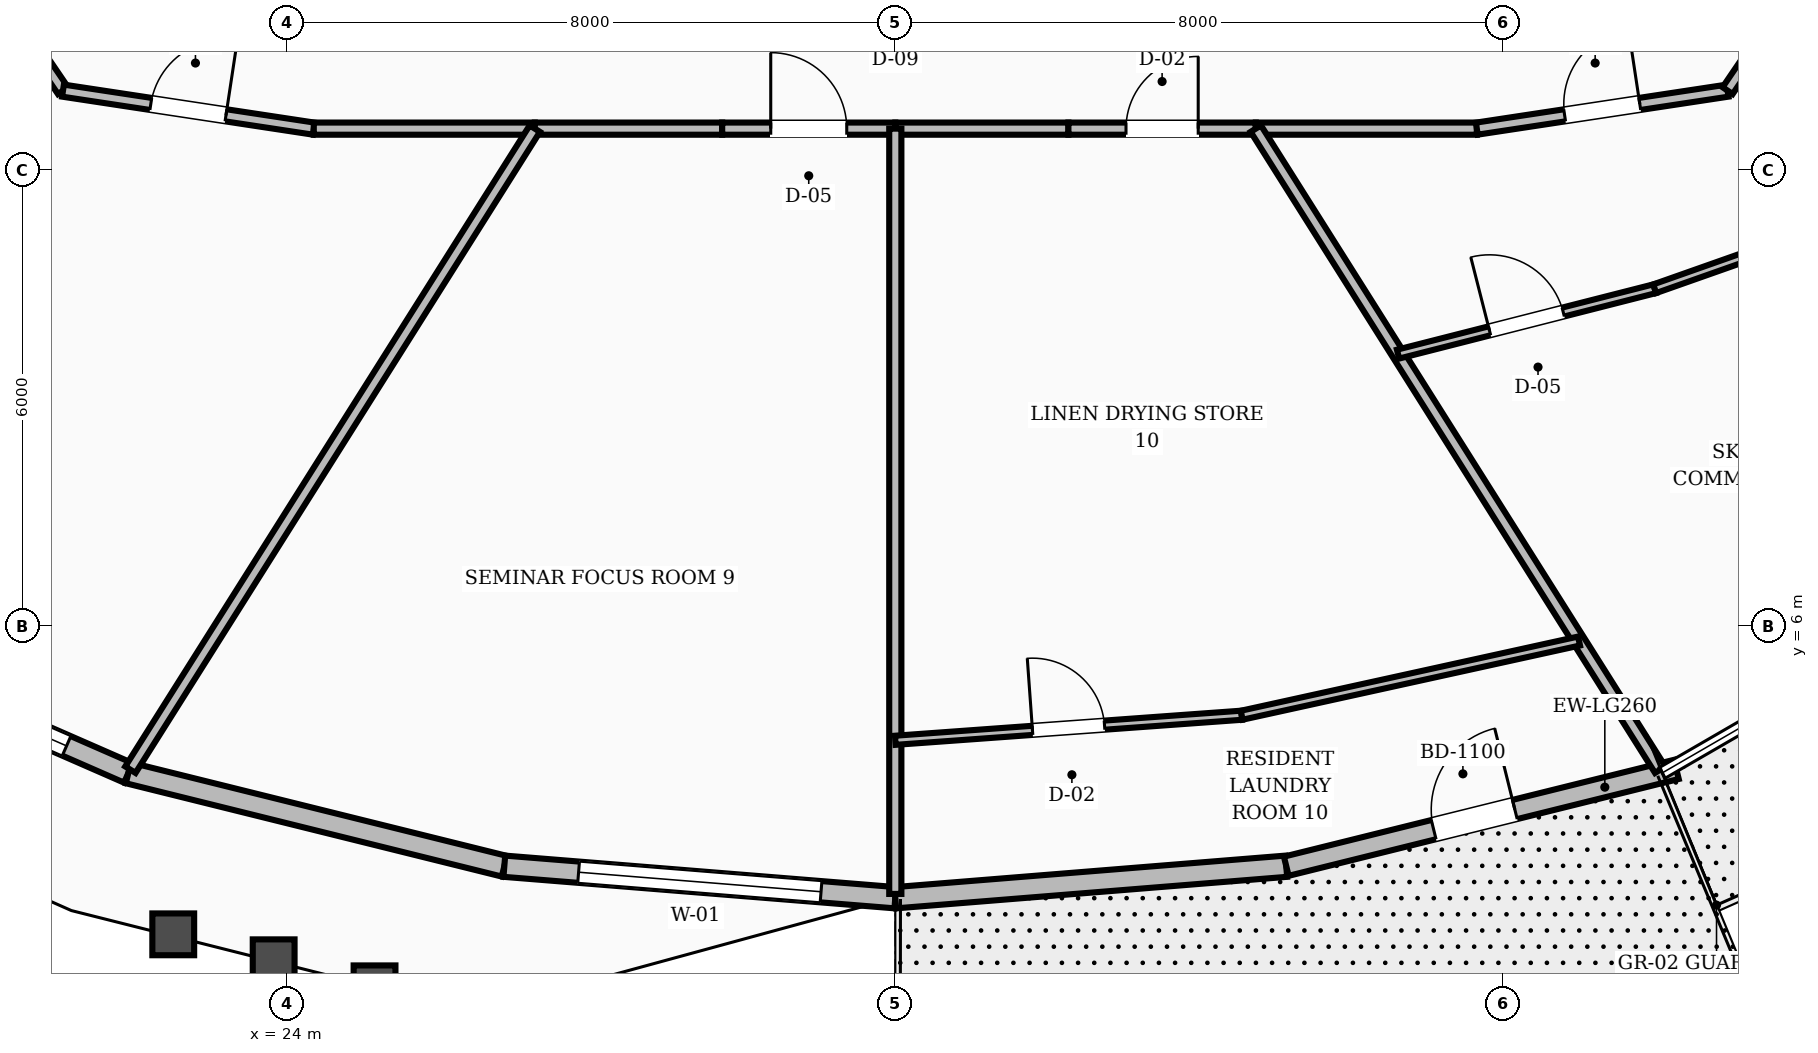
"""IFC4 building model, lengths in metres.
Left out: names, types, materials, properties, quantities, classifications, styles, units other than length and angle.
Written with IfcOpenShell. Run it as: python <this file> out.ifc"""

import sys

from ifc_helpers import new_model, si_unit, direction, frame, frame_2d, origin, place, context, subcontext, project, spatial, rectangle, extrude, element, fill, save


model = new_model("IFC4")
c1 = context("Model", 3, precision=1e-05, world=origin(), true_north=direction((0.0, 1.0)))
c2 = subcontext(c1, "Body", "Model", "MODEL_VIEW")
j1 = project(units=[si_unit("LENGTHUNIT", "METRE"), si_unit("PLANEANGLEUNIT", "RADIAN")], contexts=[c1])
p1 = place(None, origin())
s1 = spatial("IfcSite", under=j1, at=p1, CompositionType="ELEMENT")
p2 = place(p1, origin())
s2 = spatial("IfcBuilding", under=s1, at=p2, CompositionType="ELEMENT")
p3 = place(p2, frame((0.0, 0.0, 149.6)))
s3 = spatial("IfcBuildingStorey", under=s2, at=p3, CompositionType="ELEMENT", Elevation=149.6)
p4 = place(p3, frame((17.352, 6.067, 0.0), z_axis=(0.0, 0.0, 1.0), x_axis=(0.916239532795, -0.400630900634, 0.0)))
e1 = element("IfcWall", 1, at=p4, inside=s3, PredefinedType="STANDARD", context=c2, shape_type="SweptSolid", body=[
    extrude(rectangle(XDim=4.975, YDim=0.28, at=frame_2d((2.488, 0.0))), origin(), (0.0, 0.0, 1.0), 2.82),
])
p5 = place(p4, frame((0.887, 0.0, 0.8)))
e2 = element("IfcOpeningElement", 2, at=p5, cuts=e1, PredefinedType="OPENING", context=c2, shape_type="SweptSolid", body=[
    extrude(rectangle(XDim=3.2, YDim=1.65, at=frame_2d((1.6, 0.825))), frame((0.0, 0.15, 0.0), z_axis=(0.0, -1.0, 0.0), x_axis=(1.0, 0.0, 0.0)), (0.0, 0.0, 1.0), 0.3),
])
p6 = place(p3, frame((21.91, 4.074, 0.0), z_axis=(0.0, 0.0, 1.0), x_axis=(0.97056654197, -0.24083311153, 0.0)))
e3 = element("IfcWall", 3, at=p6, inside=s3, PredefinedType="STANDARD", context=c2, shape_type="SweptSolid", body=[
    extrude(rectangle(XDim=5.096, YDim=0.28, at=frame_2d((2.548, 0.0))), origin(), (0.0, 0.0, 1.0), 2.82),
])
p7 = place(p3, frame((26.856, 2.846, 0.0), z_axis=(0.0, 0.0, 1.0), x_axis=(0.996768172261, -0.080331878898, 0.0)))
e4 = element("IfcWall", 4, at=p7, inside=s3, PredefinedType="STANDARD", context=c2, shape_type="SweptSolid", body=[
    extrude(rectangle(XDim=5.16, YDim=0.28, at=frame_2d((2.58, 0.0))), origin(), (0.0, 0.0, 1.0), 2.82),
])
p8 = place(p7, frame((0.98, 0.0, 0.8)))
e5 = element("IfcOpeningElement", 5, at=p8, cuts=e4, PredefinedType="OPENING", context=c2, shape_type="SweptSolid", body=[
    extrude(rectangle(XDim=3.2, YDim=1.65, at=frame_2d((1.6, 0.825))), frame((0.0, 0.15, 0.0), z_axis=(0.0, -1.0, 0.0), x_axis=(1.0, 0.0, 0.0)), (0.0, 0.0, 1.0), 0.3),
])
p9 = place(p3, frame((32.0, 2.432, 0.0), z_axis=(0.0, 0.0, 1.0), x_axis=(0.996768172261, 0.080331878898, 0.0)))
e6 = element("IfcWall", 6, at=p9, inside=s3, PredefinedType="STANDARD", context=c2, shape_type="SweptSolid", body=[
    extrude(rectangle(XDim=5.16, YDim=0.28, at=frame_2d((2.58, 0.0))), origin(), (0.0, 0.0, 1.0), 2.82),
])
p10 = place(p3, frame((37.144, 2.846, 0.0), z_axis=(0.0, 0.0, 1.0), x_axis=(0.970567406562, 0.240829627165, 0.0)))
e7 = element("IfcWall", 7, at=p10, inside=s3, PredefinedType="STANDARD", context=c2, shape_type="SweptSolid", body=[
    extrude(rectangle(XDim=5.288, YDim=0.26, at=frame_2d((2.644, 0.0))), origin(), (0.0, 0.0, 1.0), 2.82),
])
p11 = place(p10, frame((1.998, 0.0, 0.0)))
e8 = element("IfcOpeningElement", 8, at=p11, cuts=e7, PredefinedType="OPENING", context=c2, shape_type="SweptSolid", body=[
    extrude(rectangle(XDim=1.1, YDim=2.15, at=frame_2d((0.55, 1.075))), frame((0.0, 0.14, 0.0), z_axis=(0.0, -1.0, 0.0), x_axis=(1.0, 0.0, 0.0)), (0.0, 0.0, 1.0), 0.28),
])
p12 = place(p3, frame((19.35, 15.548, 0.0), z_axis=(0.0, 0.0, 1.0), x_axis=(0.562674669208, -0.826678423955, 0.0)))
e9 = element("IfcWall", 9, at=p12, inside=s3, PredefinedType="SOLIDWALL", context=c2, shape_type="SweptSolid", body=[
    extrude(rectangle(XDim=3.021, YDim=0.16, at=frame_2d((1.511, 0.0))), origin(), (0.0, 0.0, 1.0), 2.8),
])
p13 = place(p3, frame((21.05, 13.05, 0.0), z_axis=(0.0, 0.0, 1.0), x_axis=(0.988710906508, -0.149835721217, 0.0)))
e10 = element("IfcWall", 10, at=p13, inside=s3, PredefinedType="SOLIDWALL", context=c2, shape_type="SweptSolid", body=[
    extrude(rectangle(XDim=3.337, YDim=0.16, at=frame_2d((1.668, 0.0))), origin(), (0.0, 0.0, 1.0), 2.8),
])
p14 = place(p13, frame((1.168, 0.0, 0.0)))
e11 = element("IfcOpeningElement", 11, at=p14, cuts=e10, PredefinedType="OPENING", context=c2, shape_type="SweptSolid", body=[
    extrude(rectangle(XDim=1.0, YDim=2.1, at=frame_2d((0.5, 1.05))), frame((0.0, 0.09, 0.0), z_axis=(0.0, -1.0, 0.0), x_axis=(1.0, 0.0, 0.0)), (0.0, 0.0, 1.0), 0.18),
])
p15 = place(p3, frame((24.349, 12.55, 0.0), z_axis=(0.0, 0.0, 1.0), x_axis=(1.0, 0.0, 0.0)))
e12 = element("IfcWall", 12, at=p15, inside=s3, PredefinedType="SOLIDWALL", context=c2, shape_type="SweptSolid", body=[
    extrude(rectangle(XDim=2.908, YDim=0.16, at=frame_2d((1.454, 0.0))), origin(), (0.0, 0.0, 1.0), 2.8),
])
p16 = place(p3, frame((27.257, 12.55, 0.0), z_axis=(0.0, 0.0, 1.0), x_axis=(1.0, 0.0, 0.0)))
e13 = element("IfcWall", 13, at=p16, inside=s3, PredefinedType="SOLIDWALL", context=c2, shape_type="SweptSolid", body=[
    extrude(rectangle(XDim=2.465, YDim=0.16, at=frame_2d((1.232, 0.0))), origin(), (0.0, 0.0, 1.0), 2.8),
])
p17 = place(p3, frame((29.722, 12.55, 0.0), z_axis=(0.0, 0.0, 1.0), x_axis=(1.0, 0.0, 0.0)))
e14 = element("IfcWall", 14, at=p17, inside=s3, PredefinedType="SOLIDWALL", context=c2, shape_type="SweptSolid", body=[
    extrude(rectangle(XDim=2.278, YDim=0.16, at=frame_2d((1.139, 0.0))), origin(), (0.0, 0.0, 1.0), 2.8),
])
p18 = place(p17, frame((0.639, 0.0, 0.0)))
e15 = element("IfcOpeningElement", 15, at=p18, cuts=e14, PredefinedType="OPENING", context=c2, shape_type="SweptSolid", body=[
    extrude(rectangle(XDim=1.0, YDim=2.1, at=frame_2d((0.5, 1.05))), frame((0.0, 0.09, 0.0), z_axis=(0.0, -1.0, 0.0), x_axis=(1.0, 0.0, 0.0)), (0.0, 0.0, 1.0), 0.18),
])
p19 = place(p3, frame((32.0, 12.55, 0.0), z_axis=(0.0, 0.0, 1.0), x_axis=(1.0, 0.0, 0.0)))
e16 = element("IfcWall", 16, at=p19, inside=s3, PredefinedType="SOLIDWALL", context=c2, shape_type="SweptSolid", body=[
    extrude(rectangle(XDim=2.278, YDim=0.16, at=frame_2d((1.139, 0.0))), origin(), (0.0, 0.0, 1.0), 2.8),
])
p20 = place(p3, frame((34.278, 12.55, 0.0), z_axis=(0.0, 0.0, 1.0), x_axis=(1.0, 0.0, 0.0)))
e17 = element("IfcWall", 17, at=p20, inside=s3, PredefinedType="SOLIDWALL", context=c2, shape_type="SweptSolid", body=[
    extrude(rectangle(XDim=2.465, YDim=0.16, at=frame_2d((1.232, 0.0))), origin(), (0.0, 0.0, 1.0), 2.8),
])
p21 = place(p20, frame((0.758, 0.0, 0.0)))
e18 = element("IfcOpeningElement", 18, at=p21, cuts=e17, PredefinedType="OPENING", context=c2, shape_type="SweptSolid", body=[
    extrude(rectangle(XDim=0.95, YDim=2.1, at=frame_2d((0.475, 1.05))), frame((0.0, 0.09, 0.0), z_axis=(0.0, -1.0, 0.0), x_axis=(1.0, 0.0, 0.0)), (0.0, 0.0, 1.0), 0.18),
])
p22 = place(p3, frame((36.743, 12.55, 0.0), z_axis=(0.0, 0.0, 1.0), x_axis=(1.0, 0.0, 0.0)))
e19 = element("IfcWall", 19, at=p22, inside=s3, PredefinedType="SOLIDWALL", context=c2, shape_type="SweptSolid", body=[
    extrude(rectangle(XDim=2.908, YDim=0.16, at=frame_2d((1.454, 0.0))), origin(), (0.0, 0.0, 1.0), 2.8),
])
p23 = place(p3, frame((39.651, 12.55, 0.0), z_axis=(0.0, 0.0, 1.0), x_axis=(0.988710906508, 0.149835721217, 0.0)))
e20 = element("IfcWall", 20, at=p23, inside=s3, PredefinedType="SOLIDWALL", context=c2, shape_type="SweptSolid", body=[
    extrude(rectangle(XDim=3.337, YDim=0.16, at=frame_2d((1.668, 0.0))), origin(), (0.0, 0.0, 1.0), 2.8),
])
p24 = place(p23, frame((1.168, 0.0, 0.0)))
e21 = element("IfcOpeningElement", 21, at=p24, cuts=e20, PredefinedType="OPENING", context=c2, shape_type="SweptSolid", body=[
    extrude(rectangle(XDim=1.0, YDim=2.1, at=frame_2d((0.5, 1.05))), frame((0.0, 0.09, 0.0), z_axis=(0.0, -1.0, 0.0), x_axis=(1.0, 0.0, 0.0)), (0.0, 0.0, 1.0), 0.18),
])
p25 = place(p3, frame((42.95, 13.05, 0.0), z_axis=(0.0, 0.0, 1.0), x_axis=(0.562674669208, 0.826678423955, 0.0)))
e22 = element("IfcWall", 22, at=p25, inside=s3, PredefinedType="SOLIDWALL", context=c2, shape_type="SweptSolid", body=[
    extrude(rectangle(XDim=3.021, YDim=0.16, at=frame_2d((1.511, 0.0))), origin(), (0.0, 0.0, 1.0), 2.8),
])
p26 = place(p3, frame((36.743, 12.55, 0.0), z_axis=(0.0, 0.0, 1.0), x_axis=(0.533539707284, -0.84577501781, 0.0)))
e23 = element("IfcWall", 23, at=p26, inside=s3, PredefinedType="SOLIDWALL", context=c2, shape_type="SweptSolid", body=[
    extrude(rectangle(XDim=9.972, YDim=0.16, at=frame_2d((4.986, 0.0))), origin(), (0.0, 0.0, 1.0), 2.8),
])
p27 = place(p3, frame((38.614, 9.583, 0.0), z_axis=(0.0, 0.0, 1.0), x_axis=(0.969019467612, 0.246984354543, 0.0)))
e24 = element("IfcWall", 24, at=p27, inside=s3, PredefinedType="PARTITIONING", context=c2, shape_type="SweptSolid", body=[
    extrude(rectangle(XDim=3.484, YDim=0.12, at=frame_2d((1.742, 0.0))), origin(), (0.0, 0.0, 1.0), 2.8),
])
p28 = place(p27, frame((1.242, 0.0, 0.0)))
e25 = element("IfcOpeningElement", 25, at=p28, cuts=e24, PredefinedType="OPENING", context=c2, shape_type="SweptSolid", body=[
    extrude(rectangle(XDim=1.0, YDim=2.1, at=frame_2d((0.5, 1.05))), frame((0.0, 0.07, 0.0), z_axis=(0.0, -1.0, 0.0), x_axis=(1.0, 0.0, 0.0)), (0.0, 0.0, 1.0), 0.14),
])
p29 = place(p3, frame((41.991, 10.444, 0.0), z_axis=(0.0, 0.0, 1.0), x_axis=(0.943035086746, 0.332693289932, 0.0)))
e26 = element("IfcWall", 26, at=p29, inside=s3, PredefinedType="PARTITIONING", context=c2, shape_type="SweptSolid", body=[
    extrude(rectangle(XDim=3.726, YDim=0.12, at=frame_2d((1.863, 0.0))), origin(), (0.0, 0.0, 1.0), 2.8),
])
p30 = place(p3, frame((27.257, 12.55, 0.0), z_axis=(0.0, 0.0, 1.0), x_axis=(-0.533539707284, -0.84577501781, 0.0)))
e27 = element("IfcWall", 27, at=p30, inside=s3, PredefinedType="SOLIDWALL", context=c2, shape_type="SweptSolid", body=[
    extrude(rectangle(XDim=9.972, YDim=0.16, at=frame_2d((4.986, 0.0))), origin(), (0.0, 0.0, 1.0), 2.8),
])
p31 = place(p3, frame((32.0, 12.55, 0.0), z_axis=(0.0, 0.0, 1.0), x_axis=(0.0, -1.0, 0.0)))
e28 = element("IfcWall", 28, at=p31, inside=s3, PredefinedType="SOLIDWALL", context=c2, shape_type="SweptSolid", body=[
    extrude(rectangle(XDim=10.068, YDim=0.16, at=frame_2d((5.034, 0.0))), origin(), (0.0, 0.0, 1.0), 2.8),
])
p32 = place(p3, frame((32.0, 4.503, 0.0), z_axis=(0.0, 0.0, 1.0), x_axis=(0.997394556416, 0.072139440191, 0.0)))
e29 = element("IfcWall", 29, at=p32, inside=s3, PredefinedType="PARTITIONING", context=c2, shape_type="SweptSolid", body=[
    extrude(rectangle(XDim=4.569, YDim=0.12, at=frame_2d((2.284, 0.0))), origin(), (0.0, 0.0, 1.0), 2.8),
])
p33 = place(p32, frame((1.81, 0.0, 0.0)))
e30 = element("IfcOpeningElement", 30, at=p33, cuts=e29, PredefinedType="OPENING", context=c2, shape_type="SweptSolid", body=[
    extrude(rectangle(XDim=0.95, YDim=2.1, at=frame_2d((0.475, 1.05))), frame((0.0, 0.07, 0.0), z_axis=(0.0, -1.0, 0.0), x_axis=(1.0, 0.0, 0.0)), (0.0, 0.0, 1.0), 0.14),
])
p34 = place(p3, frame((36.557, 4.833, 0.0), z_axis=(0.0, 0.0, 1.0), x_axis=(0.976660021945, 0.21479106484, 0.0)))
e31 = element("IfcWall", 31, at=p34, inside=s3, PredefinedType="PARTITIONING", context=c2, shape_type="SweptSolid", body=[
    extrude(rectangle(XDim=4.544, YDim=0.12, at=frame_2d((2.272, 0.0))), origin(), (0.0, 0.0, 1.0), 2.8),
])
p35 = place(p5, origin())
e32 = element("IfcWindow", 32, at=p35, inside=s3, PartitioningType="SINGLE_PANEL", PredefinedType="WINDOW", context=c2, shape_type="SweptSolid", body=[
    extrude(rectangle(XDim=3.2, YDim=1.65, at=frame_2d((1.6, 0.825))), frame((0.0, 0.03, 0.0), z_axis=(0.0, -1.0, 0.0), x_axis=(1.0, 0.0, 0.0)), (0.0, 0.0, 1.0), 0.06),
])
fill(e2, e32)
p36 = place(p8, origin())
e33 = element("IfcWindow", 33, at=p36, inside=s3, PartitioningType="SINGLE_PANEL", PredefinedType="WINDOW", context=c2, shape_type="SweptSolid", body=[
    extrude(rectangle(XDim=3.2, YDim=1.65, at=frame_2d((1.6, 0.825))), frame((0.0, 0.03, 0.0), z_axis=(0.0, -1.0, 0.0), x_axis=(1.0, 0.0, 0.0)), (0.0, 0.0, 1.0), 0.06),
])
fill(e5, e33)
p37 = place(p11, origin())
e34 = element("IfcDoor", 34, at=p37, inside=s3, OperationType="SINGLE_SWING_RIGHT", PredefinedType="DOOR", context=c2, shape_type="SweptSolid", body=[
    extrude(rectangle(XDim=1.1, YDim=2.15, at=frame_2d((0.55, 1.075))), frame((0.0, 0.025, 0.0), z_axis=(0.0, -1.0, 0.0), x_axis=(1.0, 0.0, 0.0)), (0.0, 0.0, 1.0), 0.05),
])
fill(e8, e34)
p38 = place(p24, origin())
e35 = element("IfcDoor", 35, at=p38, inside=s3, OperationType="SINGLE_SWING_RIGHT", PredefinedType="DOOR", context=c2, shape_type="SweptSolid", body=[
    extrude(rectangle(XDim=1.0, YDim=2.1, at=frame_2d((0.5, 1.05))), frame((0.0, 0.025, 0.0), z_axis=(0.0, -1.0, 0.0), x_axis=(1.0, 0.0, 0.0)), (0.0, 0.0, 1.0), 0.05),
])
fill(e21, e35)
p39 = place(p28, origin())
e36 = element("IfcDoor", 36, at=p39, inside=s3, OperationType="SINGLE_SWING_LEFT", PredefinedType="DOOR", context=c2, shape_type="SweptSolid", body=[
    extrude(rectangle(XDim=1.0, YDim=2.1, at=frame_2d((0.5, 1.05))), frame((0.0, 0.025, 0.0), z_axis=(0.0, -1.0, 0.0), x_axis=(1.0, 0.0, 0.0)), (0.0, 0.0, 1.0), 0.05),
])
fill(e25, e36)
p40 = place(p14, origin())
e37 = element("IfcDoor", 37, at=p40, inside=s3, OperationType="SINGLE_SWING_RIGHT", PredefinedType="DOOR", context=c2, shape_type="SweptSolid", body=[
    extrude(rectangle(XDim=1.0, YDim=2.1, at=frame_2d((0.5, 1.05))), frame((0.0, 0.025, 0.0), z_axis=(0.0, -1.0, 0.0), x_axis=(1.0, 0.0, 0.0)), (0.0, 0.0, 1.0), 0.05),
])
fill(e11, e37)
p41 = place(p18, origin())
e38 = element("IfcDoor", 38, at=p41, inside=s3, OperationType="SINGLE_SWING_LEFT", PredefinedType="DOOR", context=c2, shape_type="SweptSolid", body=[
    extrude(rectangle(XDim=1.0, YDim=2.1, at=frame_2d((0.5, 1.05))), frame((0.0, 0.025, 0.0), z_axis=(0.0, -1.0, 0.0), x_axis=(1.0, 0.0, 0.0)), (0.0, 0.0, 1.0), 0.05),
])
fill(e15, e38)
p42 = place(p21, origin())
e39 = element("IfcDoor", 39, at=p42, inside=s3, OperationType="SINGLE_SWING_RIGHT", PredefinedType="DOOR", context=c2, shape_type="SweptSolid", body=[
    extrude(rectangle(XDim=0.95, YDim=2.1, at=frame_2d((0.475, 1.05))), frame((0.0, 0.025, 0.0), z_axis=(0.0, -1.0, 0.0), x_axis=(1.0, 0.0, 0.0)), (0.0, 0.0, 1.0), 0.05),
])
fill(e18, e39)
p43 = place(p33, origin())
e40 = element("IfcDoor", 40, at=p43, inside=s3, OperationType="SINGLE_SWING_LEFT", PredefinedType="DOOR", context=c2, shape_type="SweptSolid", body=[
    extrude(rectangle(XDim=0.95, YDim=2.1, at=frame_2d((0.475, 1.05))), frame((0.0, 0.025, 0.0), z_axis=(0.0, -1.0, 0.0), x_axis=(1.0, 0.0, 0.0)), (0.0, 0.0, 1.0), 0.05),
])
fill(e30, e40)
save(model, sys.argv[1])
